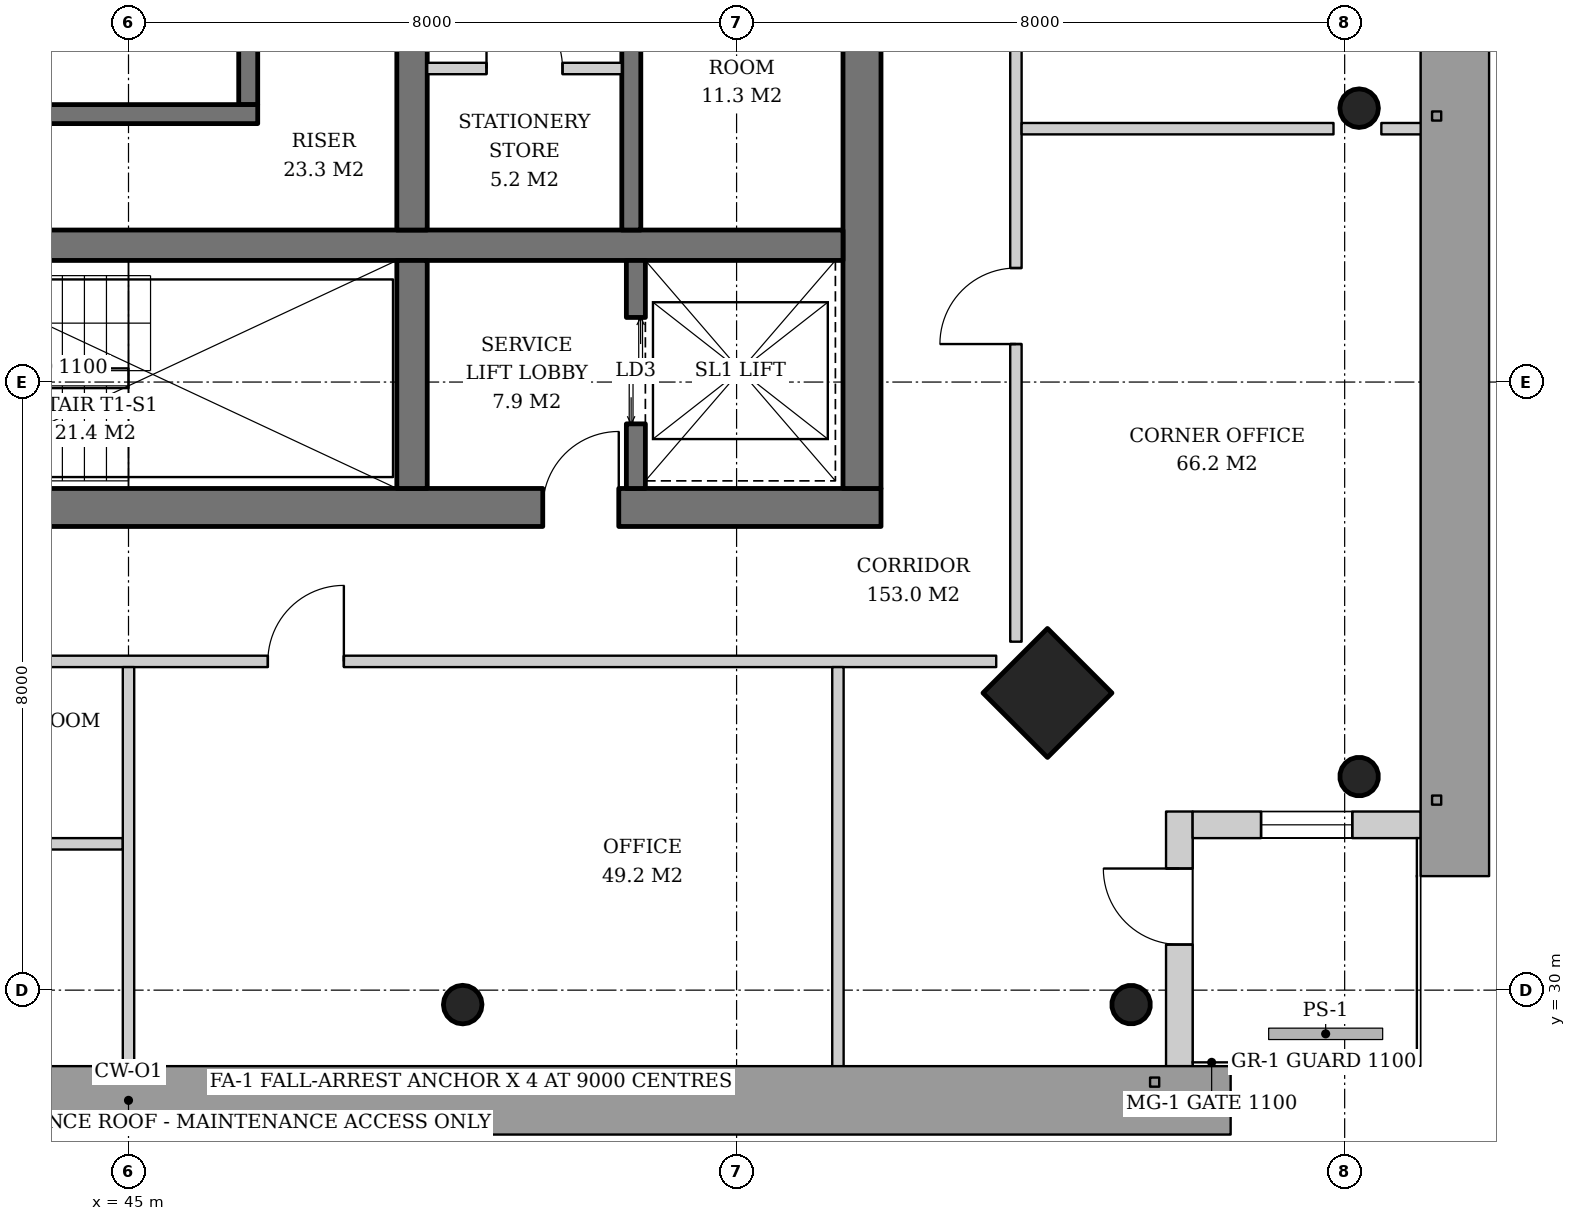
"""IFC4 building model, lengths in metres.
Left out: names, types, materials, properties, quantities, classifications, styles, units other than length and angle.
Written with IfcOpenShell. Run it as: python <this file> out.ifc"""

import sys

from ifc_helpers import new_model, si_unit, direction, frame, frame_2d, origin, origin_2d, place, context, subcontext, project, spatial, rectangle, hollow_circle, extrude, element, fill, save


model = new_model("IFC4")
c1 = context("Model", 3, precision=1e-05, world=origin(), true_north=direction((0.0, 1.0)))
c2 = subcontext(c1, "Body", "Model", "MODEL_VIEW")
j1 = project(units=[si_unit("LENGTHUNIT", "METRE"), si_unit("PLANEANGLEUNIT", "RADIAN")], contexts=[c1])
p1 = place(None, origin())
s1 = spatial("IfcSite", under=j1, at=p1, CompositionType="ELEMENT")
p2 = place(p1, origin())
s2 = spatial("IfcBuilding", under=s1, at=p2, CompositionType="ELEMENT")
p3 = place(p2, frame((0.0, 0.0, 264.2)))
s3 = spatial("IfcBuildingStorey", under=s2, at=p3, CompositionType="ELEMENT", Elevation=264.2)
p4 = place(p3, frame((61.229, 32.771, 0.0), z_axis=(-0.031898107953, 0.031898107953, 0.998981992539), x_axis=(-0.707106781187, -0.707106781187, 0.0)))
e1 = element("IfcColumn", 1, at=p4, inside=s3, PredefinedType="COLUMN", context=c2, shape_type="SweptSolid", body=[
    extrude(hollow_circle(Radius=0.254, WallThickness=0.02, at=origin_2d()), origin(), (0.0, 0.0, 1.0), 3.804),
])
p5 = place(p3, frame((61.229, 41.591, 0.0), z_axis=(-0.031912557129, 0.010594712125, 0.999434510497), x_axis=(-0.315081783451, -0.949064523485, 0.0)))
e2 = element("IfcColumn", 2, at=p5, inside=s3, PredefinedType="COLUMN", context=c2, shape_type="SweptSolid", body=[
    extrude(hollow_circle(Radius=0.254, WallThickness=0.02, at=origin_2d()), origin(), (0.0, 0.0, 1.0), 3.802),
])
p6 = place(p3, frame((57.129, 33.871, 0.0), z_axis=(-0.031962158256, 0.031962158256, 0.998977898093), x_axis=(-0.707106781187, -0.707106781187, 0.0)))
e3 = element("IfcColumn", 3, at=p6, inside=s3, PredefinedType="COLUMN", context=c2, shape_type="SweptSolid", body=[
    extrude(rectangle(XDim=1.2, YDim=1.2, at=origin_2d()), origin(), (0.0, 0.0, 1.0), 3.804),
])
p7 = place(p3, frame((58.229, 29.771, 0.0), z_axis=(-0.031898107953, 0.031898107953, 0.998981992539), x_axis=(-0.707106781187, -0.707106781187, 0.0)))
e4 = element("IfcColumn", 4, at=p7, inside=s3, PredefinedType="COLUMN", context=c2, shape_type="SweptSolid", body=[
    extrude(hollow_circle(Radius=0.254, WallThickness=0.02, at=origin_2d()), origin(), (0.0, 0.0, 1.0), 3.804),
])
p8 = place(p3, frame((49.409, 29.771, 0.0), z_axis=(-0.010594712125, 0.031912557129, 0.999434510497), x_axis=(-0.949064523485, -0.315081783451, 0.0)))
e5 = element("IfcColumn", 5, at=p8, inside=s3, PredefinedType="COLUMN", context=c2, shape_type="SweptSolid", body=[
    extrude(hollow_circle(Radius=0.254, WallThickness=0.02, at=origin_2d()), origin(), (0.0, 0.0, 1.0), 3.802),
])
p9 = place(p3, frame((35.1, 36.35, 0.0), z_axis=(0.0, 0.0, 1.0), x_axis=(1.0, 0.0, 0.0)))
e6 = element("IfcWall", 6, at=p9, inside=s3, PredefinedType="SHEAR", context=c2, shape_type="SweptSolid", body=[
    extrude(rectangle(XDim=19.8, YDim=0.5, at=frame_2d((9.9, 0.0))), origin(), (0.0, 0.0, 1.0), 3.8),
])
p10 = place(p9, frame((3.9, 0.0, 0.0)))
e7 = element("IfcOpeningElement", 7, at=p10, cuts=e6, PredefinedType="OPENING", context=c2, shape_type="SweptSolid", body=[
    extrude(rectangle(XDim=1.0, YDim=2.1, at=frame_2d((0.5, 1.05))), frame((0.0, 0.26, 0.0), z_axis=(0.0, -1.0, 0.0), x_axis=(1.0, 0.0, 0.0)), (0.0, 0.0, 1.0), 0.52),
])
p11 = place(p9, frame((15.35, 0.0, 0.0)))
e8 = element("IfcOpeningElement", 8, at=p11, cuts=e6, PredefinedType="OPENING", context=c2, shape_type="SweptSolid", body=[
    extrude(rectangle(XDim=1.0, YDim=2.1, at=frame_2d((0.5, 1.05))), frame((0.0, 0.26, 0.0), z_axis=(0.0, -1.0, 0.0), x_axis=(1.0, 0.0, 0.0)), (0.0, 0.0, 1.0), 0.52),
])
p12 = place(p3, frame((54.65, 36.6, 0.0), z_axis=(0.0, 0.0, 1.0), x_axis=(0.0, 1.0, 0.0)))
e9 = element("IfcWall", 9, at=p12, inside=s3, PredefinedType="SHEAR", context=c2, shape_type="SweptSolid", body=[
    extrude(rectangle(XDim=18.8, YDim=0.5, at=frame_2d((9.4, 0.0))), origin(), (0.0, 0.0, 1.0), 3.8),
])
p13 = place(p12, frame((8.5, 0.0, 0.0)))
e10 = element("IfcOpeningElement", 10, at=p13, cuts=e9, PredefinedType="OPENING", context=c2, shape_type="SweptSolid", body=[
    extrude(rectangle(XDim=1.8, YDim=2.4, at=frame_2d((0.9, 1.2))), frame((0.0, 0.26, 0.0), z_axis=(0.0, -1.0, 0.0), x_axis=(1.0, 0.0, 0.0)), (0.0, 0.0, 1.0), 0.52),
])
p14 = place(p3, frame((35.6, 39.8, 0.0), z_axis=(0.0, 0.0, 1.0), x_axis=(1.0, 0.0, 0.0)))
e11 = element("IfcWall", 11, at=p14, inside=s3, PredefinedType="SHEAR", context=c2, shape_type="SweptSolid", body=[
    extrude(rectangle(XDim=18.8, YDim=0.4, at=frame_2d((9.4, 0.0))), origin(), (0.0, 0.0, 1.0), 3.8),
])
p15 = place(p3, frame((48.73, 36.6, 0.0), z_axis=(0.0, 0.0, 1.0), x_axis=(0.0, 1.0, 0.0)))
e12 = element("IfcWall", 12, at=p15, inside=s3, PredefinedType="SHEAR", context=c2, shape_type="SweptSolid", body=[
    extrude(rectangle(XDim=3.0, YDim=0.4, at=frame_2d((1.5, 0.0))), origin(), (0.0, 0.0, 1.0), 3.8),
])
p16 = place(p3, frame((48.73, 40.0, 0.0), z_axis=(0.0, 0.0, 1.0), x_axis=(0.0, 1.0, 0.0)))
e13 = element("IfcWall", 13, at=p16, inside=s3, PredefinedType="SHEAR", context=c2, shape_type="SweptSolid", body=[
    extrude(rectangle(XDim=12.0, YDim=0.4, at=frame_2d((6.0, 0.0))), origin(), (0.0, 0.0, 1.0), 3.8),
])
p17 = place(p3, frame((58.825, 29.0, 0.0), z_axis=(0.0, 0.0, 1.0), x_axis=(0.0, 1.0, 0.0)))
e14 = element("IfcWall", 14, at=p17, inside=s3, PredefinedType="SOLIDWALL", context=c2, shape_type="SweptSolid", body=[
    extrude(rectangle(XDim=3.35, YDim=0.35, at=frame_2d((1.675, 0.0))), origin(), (0.0, 0.0, 1.0), 3.62),
])
p18 = place(p17, frame((1.6, 0.0, 0.0)))
e15 = element("IfcOpeningElement", 15, at=p18, cuts=e14, PredefinedType="OPENING", context=c2, shape_type="SweptSolid", body=[
    extrude(rectangle(XDim=1.0, YDim=2.4, at=frame_2d((0.5, 1.2))), frame((0.0, 0.185, 0.0), z_axis=(0.0, -1.0, 0.0), x_axis=(1.0, 0.0, 0.0)), (0.0, 0.0, 1.0), 0.37),
])
p19 = place(p3, frame((59.0, 32.175, 0.0), z_axis=(0.0, 0.0, 1.0), x_axis=(1.0, 0.0, 0.0)))
e16 = element("IfcWall", 16, at=p19, inside=s3, PredefinedType="SOLIDWALL", context=c2, shape_type="SweptSolid", body=[
    extrude(rectangle(XDim=3.0, YDim=0.35, at=frame_2d((1.5, 0.0))), origin(), (0.0, 0.0, 1.0), 3.62),
])
p20 = place(p19, frame((0.9, 0.0, 0.6)))
e17 = element("IfcOpeningElement", 17, at=p20, cuts=e16, PredefinedType="OPENING", context=c2, shape_type="SweptSolid", body=[
    extrude(rectangle(XDim=1.2, YDim=2.55, at=frame_2d((0.6, 1.275))), frame((0.0, 0.185, 0.0), z_axis=(0.0, -1.0, 0.0), x_axis=(1.0, 0.0, 0.0)), (0.0, 0.0, 1.0), 0.37),
])
p21 = place(p3, frame((51.675, 36.6, 0.0), z_axis=(0.0, 0.0, 1.0), x_axis=(0.0, 1.0, 0.0)))
e18 = element("IfcWall", 18, at=p21, inside=s3, PredefinedType="SHEAR", context=c2, shape_type="SweptSolid", body=[
    extrude(rectangle(XDim=3.0, YDim=0.25, at=frame_2d((1.5, 0.0))), origin(), (0.0, 0.0, 1.0), 3.8),
])
p22 = place(p21, frame((0.85, 0.0, 0.0)))
e19 = element("IfcOpeningElement", 19, at=p22, cuts=e18, PredefinedType="OPENING", context=c2, shape_type="SweptSolid", body=[
    extrude(rectangle(XDim=1.4, YDim=2.4, at=frame_2d((0.7, 1.2))), frame((0.0, 0.135, 0.0), z_axis=(0.0, -1.0, 0.0), x_axis=(1.0, 0.0, 0.0)), (0.0, 0.0, 1.0), 0.27),
])
p23 = place(p3, frame((46.575, 44.25, 0.0), z_axis=(0.0, 0.0, 1.0), x_axis=(0.0, -1.0, 0.0)))
e20 = element("IfcWall", 20, at=p23, inside=s3, PredefinedType="SHEAR", context=c2, shape_type="SweptSolid", body=[
    extrude(rectangle(XDim=2.6, YDim=0.25, at=frame_2d((1.3, 0.0))), origin(), (0.0, 0.0, 1.0), 3.8),
])
p24 = place(p3, frame((35.6, 41.525, 0.0), z_axis=(0.0, 0.0, 1.0), x_axis=(1.0, 0.0, 0.0)))
e21 = element("IfcWall", 21, at=p24, inside=s3, PredefinedType="SHEAR", context=c2, shape_type="SweptSolid", body=[
    extrude(rectangle(XDim=11.1, YDim=0.25, at=frame_2d((5.55, 0.0))), origin(), (0.0, 0.0, 1.0), 3.8),
])
p25 = place(p3, frame((51.615, 44.25, 0.0), z_axis=(0.0, 0.0, 1.0), x_axis=(0.0, -1.0, 0.0)))
e22 = element("IfcWall", 22, at=p25, inside=s3, PredefinedType="SHEAR", context=c2, shape_type="SweptSolid", body=[
    extrude(rectangle(XDim=4.25, YDim=0.25, at=frame_2d((2.125, 0.0))), origin(), (0.0, 0.0, 1.0), 3.8),
])
p26 = place(p3, frame((48.93, 42.125, 0.0), z_axis=(0.0, 0.0, 1.0), x_axis=(1.0, 0.0, 0.0)))
e23 = element("IfcWall", 23, at=p26, inside=s3, PredefinedType="SOLIDWALL", context=c2, shape_type="SweptSolid", body=[
    extrude(rectangle(XDim=2.56, YDim=0.15, at=frame_2d((1.28, 0.0))), origin(), (0.0, 0.0, 1.0), 3.62),
])
p27 = place(p26, frame((0.78, 0.0, 0.0)))
e24 = element("IfcOpeningElement", 24, at=p27, cuts=e23, PredefinedType="OPENING", context=c2, shape_type="SweptSolid", body=[
    extrude(rectangle(XDim=1.0, YDim=2.1, at=frame_2d((0.5, 1.05))), frame((0.0, 0.085, 0.0), z_axis=(0.0, -1.0, 0.0), x_axis=(1.0, 0.0, 0.0)), (0.0, 0.0, 1.0), 0.17),
])
p28 = place(p3, frame((56.675, 34.584, 0.0), z_axis=(0.0, 0.0, 1.0), x_axis=(0.0, 1.0, 0.0)))
e25 = element("IfcWall", 25, at=p28, inside=s3, PredefinedType="PARTITIONING", context=c2, shape_type="SweptSolid", body=[
    extrude(rectangle(XDim=22.832, YDim=0.15, at=frame_2d((11.416, 0.0))), origin(), (0.0, 0.0, 1.0), 3.02),
])
p29 = place(p28, frame((3.916, 0.0, 0.0)))
e26 = element("IfcOpeningElement", 26, at=p29, cuts=e25, PredefinedType="OPENING", context=c2, shape_type="SweptSolid", body=[
    extrude(rectangle(XDim=1.0, YDim=2.1, at=frame_2d((0.5, 1.05))), frame((0.0, 0.085, 0.0), z_axis=(0.0, -1.0, 0.0), x_axis=(1.0, 0.0, 0.0)), (0.0, 0.0, 1.0), 0.17),
])
p30 = place(p28, frame((8.583, 0.0, 0.0)))
e27 = element("IfcOpeningElement", 27, at=p30, cuts=e25, PredefinedType="OPENING", context=c2, shape_type="SweptSolid", body=[
    extrude(rectangle(XDim=1.0, YDim=2.1, at=frame_2d((0.5, 1.05))), frame((0.0, 0.085, 0.0), z_axis=(0.0, -1.0, 0.0), x_axis=(1.0, 0.0, 0.0)), (0.0, 0.0, 1.0), 0.17),
])
p31 = place(p28, frame((13.249, 0.0, 0.0)))
e28 = element("IfcOpeningElement", 28, at=p31, cuts=e25, PredefinedType="OPENING", context=c2, shape_type="SweptSolid", body=[
    extrude(rectangle(XDim=1.0, YDim=2.1, at=frame_2d((0.5, 1.05))), frame((0.0, 0.085, 0.0), z_axis=(0.0, -1.0, 0.0), x_axis=(1.0, 0.0, 0.0)), (0.0, 0.0, 1.0), 0.17),
])
p32 = place(p28, frame((17.916, 0.0, 0.0)))
e29 = element("IfcOpeningElement", 29, at=p32, cuts=e25, PredefinedType="OPENING", context=c2, shape_type="SweptSolid", body=[
    extrude(rectangle(XDim=1.0, YDim=2.1, at=frame_2d((0.5, 1.05))), frame((0.0, 0.085, 0.0), z_axis=(0.0, -1.0, 0.0), x_axis=(1.0, 0.0, 0.0)), (0.0, 0.0, 1.0), 0.17),
])
p33 = place(p3, frame((56.75, 41.333, 0.0), z_axis=(0.0, 0.0, 1.0), x_axis=(1.0, 0.0, 0.0)))
e30 = element("IfcWall", 30, at=p33, inside=s3, PredefinedType="PARTITIONING", context=c2, shape_type="SweptSolid", body=[
    extrude(rectangle(XDim=4.103, YDim=0.15, at=frame_2d((2.052, 0.0))), origin(), (0.0, 0.0, 1.0), 3.62),
])
p34 = place(p3, frame((61.483, 41.333, 0.0), z_axis=(0.0, 0.0, 1.0), x_axis=(1.0, 0.0, 0.0)))
e31 = element("IfcWall", 31, at=p34, inside=s3, PredefinedType="PARTITIONING", context=c2, shape_type="SweptSolid", body=[
    extrude(rectangle(XDim=0.557, YDim=0.15, at=frame_2d((0.279, 0.0))), origin(), (0.0, 0.0, 1.0), 3.62),
])
p35 = place(p3, frame((40.408, 31.925, 0.0), z_axis=(0.0, 0.0, 1.0), x_axis=(1.0, 0.0, 0.0)))
e32 = element("IfcWall", 32, at=p35, inside=s3, PredefinedType="PARTITIONING", context=c2, shape_type="SweptSolid", body=[
    extrude(rectangle(XDim=4.517, YDim=0.15, at=frame_2d((2.258, 0.0))), origin(), (0.0, 0.0, 1.0), 3.12),
])
p36 = place(p3, frame((33.584, 34.325, 0.0), z_axis=(0.0, 0.0, 1.0), x_axis=(1.0, 0.0, 0.0)))
e33 = element("IfcWall", 33, at=p36, inside=s3, PredefinedType="PARTITIONING", context=c2, shape_type="SweptSolid", body=[
    extrude(rectangle(XDim=22.832, YDim=0.15, at=frame_2d((11.416, 0.0))), origin(), (0.0, 0.0, 1.0), 3.02),
])
p37 = place(p36, frame((3.916, 0.0, 0.0)))
e34 = element("IfcOpeningElement", 34, at=p37, cuts=e33, PredefinedType="OPENING", context=c2, shape_type="SweptSolid", body=[
    extrude(rectangle(XDim=1.0, YDim=2.1, at=frame_2d((0.5, 1.05))), frame((0.0, 0.085, 0.0), z_axis=(0.0, -1.0, 0.0), x_axis=(1.0, 0.0, 0.0)), (0.0, 0.0, 1.0), 0.17),
])
p38 = place(p36, frame((8.583, 0.0, 0.0)))
e35 = element("IfcOpeningElement", 35, at=p38, cuts=e33, PredefinedType="OPENING", context=c2, shape_type="SweptSolid", body=[
    extrude(rectangle(XDim=1.0, YDim=2.1, at=frame_2d((0.5, 1.05))), frame((0.0, 0.085, 0.0), z_axis=(0.0, -1.0, 0.0), x_axis=(1.0, 0.0, 0.0)), (0.0, 0.0, 1.0), 0.17),
])
p39 = place(p36, frame((13.249, 0.0, 0.0)))
e36 = element("IfcOpeningElement", 36, at=p39, cuts=e33, PredefinedType="OPENING", context=c2, shape_type="SweptSolid", body=[
    extrude(rectangle(XDim=1.0, YDim=2.1, at=frame_2d((0.5, 1.05))), frame((0.0, 0.085, 0.0), z_axis=(0.0, -1.0, 0.0), x_axis=(1.0, 0.0, 0.0)), (0.0, 0.0, 1.0), 0.17),
])
for number, where, z_axis, x_axis in (
    (37, (45.0, 34.25, 0.0), (0.0, 0.0, 1.0), (0.0, -1.0, 0.0)),
    (38, (54.333, 34.25, 0.0), (0.0, 0.0, 1.0), (0.0, -1.0, 0.0)),
):
    element("IfcWall", number, at=place(p3, frame(where, z_axis=z_axis, x_axis=x_axis)), inside=s3, PredefinedType="PARTITIONING", context=c2, shape_type="SweptSolid", body=[
        extrude(rectangle(XDim=5.29, YDim=0.15, at=frame_2d((2.645, 0.0))), origin(), (0.0, 0.0, 1.0), 3.12),
    ])
p40 = place(p18, origin())
e39 = element("IfcDoor", 39, at=p40, inside=s3, OperationType="SINGLE_SWING_RIGHT", PredefinedType="DOOR", context=c2, shape_type="SweptSolid", body=[
    extrude(rectangle(XDim=1.0, YDim=2.4, at=frame_2d((0.5, 1.2))), frame((0.0, 0.025, 0.0), z_axis=(0.0, -1.0, 0.0), x_axis=(1.0, 0.0, 0.0)), (0.0, 0.0, 1.0), 0.05),
])
fill(e15, e39)
p41 = place(p20, origin())
e40 = element("IfcWindow", 40, at=p41, inside=s3, PartitioningType="SINGLE_PANEL", PredefinedType="WINDOW", context=c2, shape_type="SweptSolid", body=[
    extrude(rectangle(XDim=1.2, YDim=2.55, at=frame_2d((0.6, 1.275))), frame((0.0, 0.03, 0.0), z_axis=(0.0, -1.0, 0.0), x_axis=(1.0, 0.0, 0.0)), (0.0, 0.0, 1.0), 0.06),
])
fill(e17, e40)
p42 = place(p22, origin())
e41 = element("IfcDoor", 41, at=p42, inside=s3, OperationType="DOUBLE_DOOR_SLIDING", PredefinedType="DOOR", context=c2, shape_type="SweptSolid", body=[
    extrude(rectangle(XDim=1.4, YDim=2.4, at=frame_2d((0.7, 1.2))), frame((0.0, 0.025, 0.0), z_axis=(0.0, -1.0, 0.0), x_axis=(1.0, 0.0, 0.0)), (0.0, 0.0, 1.0), 0.05),
])
fill(e19, e41)
p43 = place(p27, origin())
e42 = element("IfcDoor", 42, at=p43, inside=s3, OperationType="SINGLE_SWING_LEFT", PredefinedType="DOOR", context=c2, shape_type="SweptSolid", body=[
    extrude(rectangle(XDim=1.0, YDim=2.1, at=frame_2d((0.5, 1.05))), frame((0.0, 0.025, 0.0), z_axis=(0.0, -1.0, 0.0), x_axis=(1.0, 0.0, 0.0)), (0.0, 0.0, 1.0), 0.05),
])
fill(e24, e42)
p44 = place(p11, origin())
e43 = element("IfcDoor", 43, at=p44, inside=s3, OperationType="SINGLE_SWING_RIGHT", PredefinedType="DOOR", context=c2, shape_type="SweptSolid", body=[
    extrude(rectangle(XDim=1.0, YDim=2.1, at=frame_2d((0.5, 1.05))), frame((0.0, 0.025, 0.0), z_axis=(0.0, -1.0, 0.0), x_axis=(1.0, 0.0, 0.0)), (0.0, 0.0, 1.0), 0.05),
])
fill(e8, e43)
p45 = place(p29, origin())
e44 = element("IfcDoor", 44, at=p45, inside=s3, OperationType="SINGLE_SWING_LEFT", PredefinedType="DOOR", context=c2, shape_type="SweptSolid", body=[
    extrude(rectangle(XDim=1.0, YDim=2.1, at=frame_2d((0.5, 1.05))), frame((0.0, 0.025, 0.0), z_axis=(0.0, -1.0, 0.0), x_axis=(1.0, 0.0, 0.0)), (0.0, 0.0, 1.0), 0.05),
])
fill(e26, e44)
p46 = place(p39, origin())
e45 = element("IfcDoor", 45, at=p46, inside=s3, OperationType="SINGLE_SWING_RIGHT", PredefinedType="DOOR", context=c2, shape_type="SweptSolid", body=[
    extrude(rectangle(XDim=1.0, YDim=2.1, at=frame_2d((0.5, 1.05))), frame((0.0, 0.025, 0.0), z_axis=(0.0, -1.0, 0.0), x_axis=(1.0, 0.0, 0.0)), (0.0, 0.0, 1.0), 0.05),
])
fill(e36, e45)
save(model, sys.argv[1])
